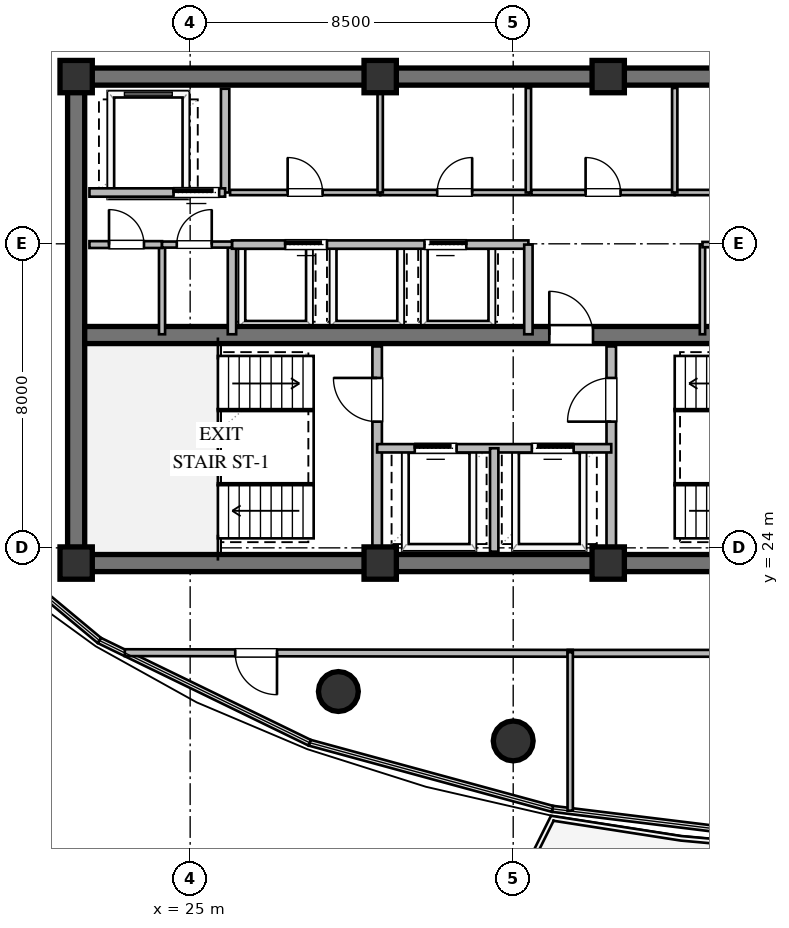
"""IFC4 building model, lengths in metres.
Left out: names, types, materials, properties, quantities, classifications, styles, units other than length and angle.
Written with IfcOpenShell. Run it as: python <this file> out.ifc"""

import sys

from ifc_helpers import new_model, si_unit, direction, frame, frame_2d, origin, origin_2d, place, context, subcontext, project, spatial, rectangle, circle, extrude, element, fill, save


model = new_model("IFC4")
c1 = context("Model", 3, precision=1e-05, world=origin(), true_north=direction((0.0, 1.0)))
c2 = subcontext(c1, "Body", "Model", "MODEL_VIEW")
j1 = project(units=[si_unit("LENGTHUNIT", "METRE"), si_unit("PLANEANGLEUNIT", "RADIAN")], contexts=[c1])
p1 = place(None, origin())
s1 = spatial("IfcSite", under=j1, at=p1, CompositionType="ELEMENT")
p2 = place(p1, origin())
s2 = spatial("IfcBuilding", under=s1, at=p2, CompositionType="ELEMENT")
p3 = place(p2, frame((0.0, 0.0, 213.6)))
s3 = spatial("IfcBuildingStorey", under=s2, at=p3, CompositionType="ELEMENT", Elevation=213.6)
for number, where, z_axis, x_axis in (
    (1, (21.775, 23.6, 0.0), (0.0, 0.0, 1.0), (1.0, 0.0, 0.0)),
    (2, (21.775, 36.4, 0.0), (0.0, 0.0, 1.0), (1.0, 0.0, 0.0)),
):
    element("IfcWall", number, at=place(p3, frame(where, z_axis=z_axis, x_axis=x_axis)), inside=s3, PredefinedType="SHEAR", context=c2, shape_type="SweptSolid", body=[
        extrude(rectangle(XDim=22.45, YDim=0.45, at=frame_2d((11.225, 0.0))), origin(), (0.0, 0.0, 1.0), 3.36),
    ])
p4 = place(p3, frame((22.0, 23.825, 0.0), z_axis=(0.0, 0.0, 1.0), x_axis=(0.0, 1.0, 0.0)))
e3 = element("IfcWall", 3, at=p4, inside=s3, PredefinedType="SHEAR", context=c2, shape_type="SweptSolid", body=[
    extrude(rectangle(XDim=12.35, YDim=0.45, at=frame_2d((6.175, 0.0))), origin(), (0.0, 0.0, 1.0), 3.36),
])
p5 = place(p3, frame((22.225, 29.6, 0.0), z_axis=(0.0, 0.0, 1.0), x_axis=(1.0, 0.0, 0.0)))
e4 = element("IfcWall", 4, at=p5, inside=s3, PredefinedType="SHEAR", context=c2, shape_type="SweptSolid", body=[
    extrude(rectangle(XDim=21.55, YDim=0.45, at=frame_2d((10.775, 0.0))), origin(), (0.0, 0.0, 1.0), 3.36),
])
p6 = place(p5, frame((12.225, 0.0, 0.0)))
e5 = element("IfcOpeningElement", 5, at=p6, cuts=e4, PredefinedType="OPENING", context=c2, shape_type="SweptSolid", body=[
    extrude(rectangle(XDim=1.15, YDim=2.1, at=frame_2d((0.575, 1.05))), frame((0.0, 0.235, 0.0), z_axis=(0.0, -1.0, 0.0), x_axis=(1.0, 0.0, 0.0)), (0.0, 0.0, 1.0), 0.47),
])
for number, where, z_axis, x_axis in (
    (6, (22.0, 23.6, 0.0), (0.0, 0.0, 1.0), (1.0, 0.0, 0.0)),
    (7, (30.0, 23.6, 0.0), (0.0, 0.0, 1.0), (1.0, 0.0, 0.0)),
    (8, (36.0, 23.6, 0.0), (0.0, 0.0, 1.0), (1.0, 0.0, 0.0)),
    (9, (36.0, 36.4, 0.0), (0.0, 0.0, 1.0), (1.0, 0.0, 0.0)),
    (10, (30.0, 36.4, 0.0), (0.0, 0.0, 1.0), (1.0, 0.0, 0.0)),
    (11, (22.0, 36.4, 0.0), (0.0, 0.0, 1.0), (1.0, 0.0, 0.0)),
):
    element("IfcColumn", number, at=place(p3, frame(where, z_axis=z_axis, x_axis=x_axis)), inside=s3, PredefinedType="COLUMN", context=c2, shape_type="SweptSolid", body=[
        extrude(rectangle(XDim=0.85, YDim=0.85, at=origin_2d()), origin(), (0.0, 0.0, 1.0), 3.6),
    ])
for number, where, z_axis, x_axis in (
    (12, (28.9, 20.22, 0.0), (0.0, 0.0, 1.0), (1.0, 0.0, 0.0)),
    (13, (33.5, 18.92, 0.0), (0.0, 0.0, 1.0), (1.0, 0.0, 0.0)),
):
    element("IfcColumn", number, at=place(p3, frame(where, z_axis=z_axis, x_axis=x_axis)), inside=s3, PredefinedType="COLUMN", context=c2, shape_type="SweptSolid", body=[
        extrude(circle(Radius=0.525, at=origin_2d()), origin(), (0.0, 0.0, 1.0), 3.6),
    ])
p7 = place(p3, frame((29.92, 23.9, 0.0), z_axis=(0.0, 0.0, 1.0), x_axis=(0.0, 1.0, 0.0)))
e14 = element("IfcWall", 14, at=p7, inside=s3, PredefinedType="SOLIDWALL", context=c2, shape_type="SweptSolid", body=[
    extrude(rectangle(XDim=5.4, YDim=0.25, at=frame_2d((2.7, 0.0))), origin(), (0.0, 0.0, 1.0), 3.36),
])
p8 = place(p7, frame((3.421, 0.0, 0.0)))
e15 = element("IfcOpeningElement", 15, at=p8, cuts=e14, PredefinedType="OPENING", context=c2, shape_type="SweptSolid", body=[
    extrude(rectangle(XDim=1.15, YDim=2.1, at=frame_2d((0.575, 1.05))), frame((0.0, 0.135, 0.0), z_axis=(0.0, -1.0, 0.0), x_axis=(1.0, 0.0, 0.0)), (0.0, 0.0, 1.0), 0.27),
])
p9 = place(p3, frame((36.08, 23.9, 0.0), z_axis=(0.0, 0.0, 1.0), x_axis=(0.0, 1.0, 0.0)))
e16 = element("IfcWall", 16, at=p9, inside=s3, PredefinedType="SOLIDWALL", context=c2, shape_type="SweptSolid", body=[
    extrude(rectangle(XDim=5.4, YDim=0.25, at=frame_2d((2.7, 0.0))), origin(), (0.0, 0.0, 1.0), 3.36),
])
p10 = place(p9, frame((3.421, 0.0, 0.0)))
e17 = element("IfcOpeningElement", 17, at=p10, cuts=e16, PredefinedType="OPENING", context=c2, shape_type="SweptSolid", body=[
    extrude(rectangle(XDim=1.15, YDim=2.1, at=frame_2d((0.575, 1.05))), frame((0.0, 0.135, 0.0), z_axis=(0.0, -1.0, 0.0), x_axis=(1.0, 0.0, 0.0)), (0.0, 0.0, 1.0), 0.27),
])
p11 = place(p3, frame((29.92, 26.62, 0.0), z_axis=(0.0, 0.0, 1.0), x_axis=(1.0, 0.0, 0.0)))
e18 = element("IfcWall", 18, at=p11, inside=s3, PredefinedType="SOLIDWALL", context=c2, shape_type="SweptSolid", body=[
    extrude(rectangle(XDim=6.16, YDim=0.22, at=frame_2d((3.08, 0.0))), origin(), (0.0, 0.0, 1.0), 3.36),
])
p12 = place(p11, frame((0.99, 0.0, 0.0)))
e19 = element("IfcOpeningElement", 19, at=p12, cuts=e18, PredefinedType="OPENING", context=c2, shape_type="SweptSolid", body=[
    extrude(rectangle(XDim=1.1, YDim=2.1, at=frame_2d((0.55, 1.05))), frame((0.0, 0.12, 0.0), z_axis=(0.0, -1.0, 0.0), x_axis=(1.0, 0.0, 0.0)), (0.0, 0.0, 1.0), 0.24),
])
p13 = place(p11, frame((4.07, 0.0, 0.0)))
e20 = element("IfcOpeningElement", 20, at=p13, cuts=e18, PredefinedType="OPENING", context=c2, shape_type="SweptSolid", body=[
    extrude(rectangle(XDim=1.1, YDim=2.1, at=frame_2d((0.55, 1.05))), frame((0.0, 0.12, 0.0), z_axis=(0.0, -1.0, 0.0), x_axis=(1.0, 0.0, 0.0)), (0.0, 0.0, 1.0), 0.24),
])
p14 = place(p3, frame((33.0, 23.9, 0.0), z_axis=(0.0, 0.0, 1.0), x_axis=(0.0, 1.0, 0.0)))
e21 = element("IfcWall", 21, at=p14, inside=s3, PredefinedType="SOLIDWALL", context=c2, shape_type="SweptSolid", body=[
    extrude(rectangle(XDim=2.72, YDim=0.22, at=frame_2d((1.36, 0.0))), origin(), (0.0, 0.0, 1.0), 3.36),
])
p15 = place(p3, frame((25.92, 33.35, 0.0), z_axis=(0.0, 0.0, 1.0), x_axis=(0.0, 1.0, 0.0)))
e22 = element("IfcWall", 22, at=p15, inside=s3, PredefinedType="SOLIDWALL", context=c2, shape_type="SweptSolid", body=[
    extrude(rectangle(XDim=2.73, YDim=0.22, at=frame_2d((1.365, 0.0))), origin(), (0.0, 0.0, 1.0), 3.36),
])
p16 = place(p3, frame((22.35, 33.35, 0.0), z_axis=(0.0, 0.0, 1.0), x_axis=(1.0, 0.0, 0.0)))
e23 = element("IfcWall", 23, at=p16, inside=s3, PredefinedType="SOLIDWALL", context=c2, shape_type="SweptSolid", body=[
    extrude(rectangle(XDim=3.57, YDim=0.22, at=frame_2d((1.785, 0.0))), origin(), (0.0, 0.0, 1.0), 3.36),
])
p17 = place(p16, frame((2.213, 0.0, 0.0)))
e24 = element("IfcOpeningElement", 24, at=p17, cuts=e23, PredefinedType="OPENING", context=c2, shape_type="SweptSolid", body=[
    extrude(rectangle(XDim=1.2, YDim=2.1, at=frame_2d((0.6, 1.05))), frame((0.0, 0.12, 0.0), z_axis=(0.0, -1.0, 0.0), x_axis=(1.0, 0.0, 0.0)), (0.0, 0.0, 1.0), 0.24),
])
p18 = place(p3, frame((26.1, 29.62, 0.0), z_axis=(0.0, 0.0, 1.0), x_axis=(0.0, 1.0, 0.0)))
e25 = element("IfcWall", 25, at=p18, inside=s3, PredefinedType="SOLIDWALL", context=c2, shape_type="SweptSolid", body=[
    extrude(rectangle(XDim=2.36, YDim=0.22, at=frame_2d((1.18, 0.0))), origin(), (0.0, 0.0, 1.0), 3.36),
])
p19 = place(p3, frame((26.1, 31.98, 0.0), z_axis=(0.0, 0.0, 1.0), x_axis=(1.0, 0.0, 0.0)))
e26 = element("IfcWall", 26, at=p19, inside=s3, PredefinedType="SOLIDWALL", context=c2, shape_type="SweptSolid", body=[
    extrude(rectangle(XDim=7.8, YDim=0.22, at=frame_2d((3.9, 0.0))), origin(), (0.0, 0.0, 1.0), 3.36),
])
p20 = place(p19, frame((1.4, 0.0, 0.0)))
e27 = element("IfcOpeningElement", 27, at=p20, cuts=e26, PredefinedType="OPENING", context=c2, shape_type="SweptSolid", body=[
    extrude(rectangle(XDim=1.1, YDim=2.1, at=frame_2d((0.55, 1.05))), frame((0.0, 0.12, 0.0), z_axis=(0.0, -1.0, 0.0), x_axis=(1.0, 0.0, 0.0)), (0.0, 0.0, 1.0), 0.24),
])
p21 = place(p19, frame((5.066, 0.0, 0.0)))
e28 = element("IfcOpeningElement", 28, at=p21, cuts=e26, PredefinedType="OPENING", context=c2, shape_type="SweptSolid", body=[
    extrude(rectangle(XDim=1.1, YDim=2.1, at=frame_2d((0.55, 1.05))), frame((0.0, 0.12, 0.0), z_axis=(0.0, -1.0, 0.0), x_axis=(1.0, 0.0, 0.0)), (0.0, 0.0, 1.0), 0.24),
])
p22 = place(p3, frame((33.9, 29.62, 0.0), z_axis=(0.0, 0.0, 1.0), x_axis=(0.0, 1.0, 0.0)))
e29 = element("IfcWall", 29, at=p22, inside=s3, PredefinedType="SOLIDWALL", context=c2, shape_type="SweptSolid", body=[
    extrude(rectangle(XDim=2.36, YDim=0.22, at=frame_2d((1.18, 0.0))), origin(), (0.0, 0.0, 1.0), 3.36),
])
p23 = place(p3, frame((26.05, 33.35, 0.0), z_axis=(0.0, 0.0, 1.0), x_axis=(1.0, 0.0, 0.0)))
e30 = element("IfcWall", 30, at=p23, inside=s3, PredefinedType="PARTITIONING", context=c2, shape_type="SweptSolid", body=[
    extrude(rectangle(XDim=3.95, YDim=0.14, at=frame_2d((1.975, 0.0))), origin(), (0.0, 0.0, 1.0), 3.36),
])
p24 = place(p23, frame((1.515, 0.0, 0.0)))
e31 = element("IfcOpeningElement", 31, at=p24, cuts=e30, PredefinedType="OPENING", context=c2, shape_type="SweptSolid", body=[
    extrude(rectangle(XDim=0.92, YDim=2.1, at=frame_2d((0.46, 1.05))), frame((0.0, 0.08, 0.0), z_axis=(0.0, -1.0, 0.0), x_axis=(1.0, 0.0, 0.0)), (0.0, 0.0, 1.0), 0.16),
])
p25 = place(p3, frame((30.0, 33.35, 0.0), z_axis=(0.0, 0.0, 1.0), x_axis=(1.0, 0.0, 0.0)))
e32 = element("IfcWall", 32, at=p25, inside=s3, PredefinedType="PARTITIONING", context=c2, shape_type="SweptSolid", body=[
    extrude(rectangle(XDim=3.92, YDim=0.14, at=frame_2d((1.96, 0.0))), origin(), (0.0, 0.0, 1.0), 3.36),
])
p26 = place(p25, frame((1.5, 0.0, 0.0)))
e33 = element("IfcOpeningElement", 33, at=p26, cuts=e32, PredefinedType="OPENING", context=c2, shape_type="SweptSolid", body=[
    extrude(rectangle(XDim=0.92, YDim=2.1, at=frame_2d((0.46, 1.05))), frame((0.0, 0.08, 0.0), z_axis=(0.0, -1.0, 0.0), x_axis=(1.0, 0.0, 0.0)), (0.0, 0.0, 1.0), 0.16),
])
for number, where, z_axis, x_axis in (
    (34, (30.0, 33.35, 0.0), (0.0, 0.0, 1.0), (0.0, 1.0, 0.0)),
    (35, (33.9, 33.35, 0.0), (0.0, 0.0, 1.0), (0.0, 1.0, 0.0)),
):
    element("IfcWall", number, at=place(p3, frame(where, z_axis=z_axis, x_axis=x_axis)), inside=s3, PredefinedType="PARTITIONING", context=c2, shape_type="SweptSolid", body=[
        extrude(rectangle(XDim=2.75, YDim=0.14, at=frame_2d((1.375, 0.0))), origin(), (0.0, 0.0, 1.0), 3.36),
    ])
p27 = place(p3, frame((33.98, 33.35, 0.0), z_axis=(0.0, 0.0, 1.0), x_axis=(1.0, 0.0, 0.0)))
e36 = element("IfcWall", 36, at=p27, inside=s3, PredefinedType="PARTITIONING", context=c2, shape_type="SweptSolid", body=[
    extrude(rectangle(XDim=3.77, YDim=0.14, at=frame_2d((1.885, 0.0))), origin(), (0.0, 0.0, 1.0), 3.36),
])
p28 = place(p27, frame((1.425, 0.0, 0.0)))
e37 = element("IfcOpeningElement", 37, at=p28, cuts=e36, PredefinedType="OPENING", context=c2, shape_type="SweptSolid", body=[
    extrude(rectangle(XDim=0.92, YDim=2.1, at=frame_2d((0.46, 1.05))), frame((0.0, 0.08, 0.0), z_axis=(0.0, -1.0, 0.0), x_axis=(1.0, 0.0, 0.0)), (0.0, 0.0, 1.0), 0.16),
])
p29 = place(p3, frame((37.75, 33.35, 0.0), z_axis=(0.0, 0.0, 1.0), x_axis=(1.0, 0.0, 0.0)))
e38 = element("IfcWall", 38, at=p29, inside=s3, PredefinedType="PARTITIONING", context=c2, shape_type="SweptSolid", body=[
    extrude(rectangle(XDim=3.77, YDim=0.14, at=frame_2d((1.885, 0.0))), origin(), (0.0, 0.0, 1.0), 3.36),
])
p30 = place(p29, frame((1.425, 0.0, 0.0)))
e39 = element("IfcOpeningElement", 39, at=p30, cuts=e38, PredefinedType="OPENING", context=c2, shape_type="SweptSolid", body=[
    extrude(rectangle(XDim=0.92, YDim=2.1, at=frame_2d((0.46, 1.05))), frame((0.0, 0.08, 0.0), z_axis=(0.0, -1.0, 0.0), x_axis=(1.0, 0.0, 0.0)), (0.0, 0.0, 1.0), 0.16),
])
p31 = place(p3, frame((37.75, 33.35, 0.0), z_axis=(0.0, 0.0, 1.0), x_axis=(0.0, 1.0, 0.0)))
e40 = element("IfcWall", 40, at=p31, inside=s3, PredefinedType="PARTITIONING", context=c2, shape_type="SweptSolid", body=[
    extrude(rectangle(XDim=2.75, YDim=0.14, at=frame_2d((1.375, 0.0))), origin(), (0.0, 0.0, 1.0), 3.36),
])
p32 = place(p3, frame((24.26, 29.62, 0.0), z_axis=(0.0, 0.0, 1.0), x_axis=(0.0, 1.0, 0.0)))
e41 = element("IfcWall", 41, at=p32, inside=s3, PredefinedType="PLUMBINGWALL", context=c2, shape_type="SweptSolid", body=[
    extrude(rectangle(XDim=2.36, YDim=0.16, at=frame_2d((1.18, 0.0))), origin(), (0.0, 0.0, 1.0), 3.36),
])
p33 = place(p3, frame((22.35, 31.98, 0.0), z_axis=(0.0, 0.0, 1.0), x_axis=(1.0, 0.0, 0.0)))
e42 = element("IfcWall", 42, at=p33, inside=s3, PredefinedType="PARTITIONING", context=c2, shape_type="SweptSolid", body=[
    extrude(rectangle(XDim=1.91, YDim=0.18, at=frame_2d((0.955, 0.0))), origin(), (0.0, 0.0, 1.0), 3.36),
])
p34 = place(p33, frame((0.515, 0.0, 0.0)))
e43 = element("IfcOpeningElement", 43, at=p34, cuts=e42, PredefinedType="OPENING", context=c2, shape_type="SweptSolid", body=[
    extrude(rectangle(XDim=0.92, YDim=2.1, at=frame_2d((0.46, 1.05))), frame((0.0, 0.1, 0.0), z_axis=(0.0, -1.0, 0.0), x_axis=(1.0, 0.0, 0.0)), (0.0, 0.0, 1.0), 0.2),
])
p35 = place(p3, frame((24.26, 31.98, 0.0), z_axis=(0.0, 0.0, 1.0), x_axis=(1.0, 0.0, 0.0)))
e44 = element("IfcWall", 44, at=p35, inside=s3, PredefinedType="PLUMBINGWALL", context=c2, shape_type="SweptSolid", body=[
    extrude(rectangle(XDim=1.84, YDim=0.16, at=frame_2d((0.92, 0.0))), origin(), (0.0, 0.0, 1.0), 3.36),
])
p36 = place(p35, frame((0.388, 0.0, 0.0)))
e45 = element("IfcOpeningElement", 45, at=p36, cuts=e44, PredefinedType="OPENING", context=c2, shape_type="SweptSolid", body=[
    extrude(rectangle(XDim=0.92, YDim=2.1, at=frame_2d((0.46, 1.05))), frame((0.0, 0.09, 0.0), z_axis=(0.0, -1.0, 0.0), x_axis=(1.0, 0.0, 0.0)), (0.0, 0.0, 1.0), 0.18),
])
p37 = place(p3, frame((38.48, 29.62, 0.0), z_axis=(0.0, 0.0, 1.0), x_axis=(0.0, 1.0, 0.0)))
e46 = element("IfcWall", 46, at=p37, inside=s3, PredefinedType="PARTITIONING", context=c2, shape_type="SweptSolid", body=[
    extrude(rectangle(XDim=2.36, YDim=0.14, at=frame_2d((1.18, 0.0))), origin(), (0.0, 0.0, 1.0), 3.36),
])
p38 = place(p3, frame((38.48, 31.98, 0.0), z_axis=(0.0, 0.0, 1.0), x_axis=(1.0, 0.0, 0.0)))
e47 = element("IfcWall", 47, at=p38, inside=s3, PredefinedType="PARTITIONING", context=c2, shape_type="SweptSolid", body=[
    extrude(rectangle(XDim=3.04, YDim=0.14, at=frame_2d((1.52, 0.0))), origin(), (0.0, 0.0, 1.0), 3.36),
])
p39 = place(p38, frame((1.045, 0.0, 0.0)))
e48 = element("IfcOpeningElement", 48, at=p39, cuts=e47, PredefinedType="OPENING", context=c2, shape_type="SweptSolid", body=[
    extrude(rectangle(XDim=0.92, YDim=2.1, at=frame_2d((0.46, 1.05))), frame((0.0, 0.08, 0.0), z_axis=(0.0, -1.0, 0.0), x_axis=(1.0, 0.0, 0.0)), (0.0, 0.0, 1.0), 0.16),
])
p40 = place(p3, frame((35.065, 21.225, 0.0), z_axis=(0.0, 0.0, 1.0), x_axis=(-0.999998948453, 0.001450204611, 0.0)))
e49 = element("IfcWall", 49, at=p40, inside=s3, PredefinedType="PARTITIONING", context=c2, shape_type="SweptSolid", body=[
    extrude(rectangle(XDim=11.784, YDim=0.18, at=frame_2d((5.892, 0.0))), origin(), (0.0, 0.0, 1.0), 2.806),
])
p41 = place(p40, frame((7.779, 0.0, 0.0)))
e50 = element("IfcOpeningElement", 50, at=p41, cuts=e49, PredefinedType="OPENING", context=c2, shape_type="SweptSolid", body=[
    extrude(rectangle(XDim=1.1, YDim=2.1, at=frame_2d((0.55, 1.05))), frame((0.0, 0.1, 0.0), z_axis=(0.0, -1.0, 0.0), x_axis=(1.0, 0.0, 0.0)), (0.0, 0.0, 1.0), 0.2),
])
p42 = place(p3, frame((46.405, 21.225, 0.0), z_axis=(0.0, 0.0, 1.0), x_axis=(-1.0, 0.0, 0.0)))
e51 = element("IfcWall", 51, at=p42, inside=s3, PredefinedType="PARTITIONING", context=c2, shape_type="SweptSolid", body=[
    extrude(rectangle(XDim=11.47, YDim=0.18, at=frame_2d((5.735, 0.0))), origin(), (0.0, 0.0, 1.0), 2.996),
])
p43 = place(p42, frame((5.135, 0.0, 0.0)))
e52 = element("IfcOpeningElement", 52, at=p43, cuts=e51, PredefinedType="OPENING", context=c2, shape_type="SweptSolid", body=[
    extrude(rectangle(XDim=1.2, YDim=2.15, at=frame_2d((0.6, 1.075))), frame((0.0, 0.1, 0.0), z_axis=(0.0, -1.0, 0.0), x_axis=(1.0, 0.0, 0.0)), (0.0, 0.0, 1.0), 0.2),
])
p44 = place(p3, frame((35.0, 21.255, 0.0), z_axis=(0.0, 0.0, 1.0), x_axis=(0.0, -1.0, 0.0)))
e53 = element("IfcWall", 53, at=p44, inside=s3, PredefinedType="PARTITIONING", context=c2, shape_type="SweptSolid", body=[
    extrude(rectangle(XDim=4.169, YDim=0.14, at=frame_2d((2.085, 0.0))), origin(), (0.0, 0.0, 1.0), 3.36),
])
p45 = place(p8, origin())
e54 = element("IfcDoor", 54, at=p45, inside=s3, OperationType="SINGLE_SWING_RIGHT", PredefinedType="DOOR", context=c2, shape_type="SweptSolid", body=[
    extrude(rectangle(XDim=1.15, YDim=2.1, at=frame_2d((0.575, 1.05))), frame((0.0, 0.025, 0.0), z_axis=(0.0, -1.0, 0.0), x_axis=(1.0, 0.0, 0.0)), (0.0, 0.0, 1.0), 0.05),
])
fill(e15, e54)
p46 = place(p10, origin())
e55 = element("IfcDoor", 55, at=p46, inside=s3, OperationType="SINGLE_SWING_LEFT", PredefinedType="DOOR", context=c2, shape_type="SweptSolid", body=[
    extrude(rectangle(XDim=1.15, YDim=2.1, at=frame_2d((0.575, 1.05))), frame((0.0, 0.025, 0.0), z_axis=(0.0, -1.0, 0.0), x_axis=(1.0, 0.0, 0.0)), (0.0, 0.0, 1.0), 0.05),
])
fill(e17, e55)
p47 = place(p12, origin())
e56 = element("IfcDoor", 56, at=p47, inside=s3, OperationType="SLIDING_TO_LEFT", PredefinedType="DOOR", context=c2, shape_type="SweptSolid", body=[
    extrude(rectangle(XDim=1.1, YDim=2.1, at=frame_2d((0.55, 1.05))), frame((0.0, 0.025, 0.0), z_axis=(0.0, -1.0, 0.0), x_axis=(1.0, 0.0, 0.0)), (0.0, 0.0, 1.0), 0.05),
])
fill(e19, e56)
p48 = place(p13, origin())
e57 = element("IfcDoor", 57, at=p48, inside=s3, OperationType="SLIDING_TO_RIGHT", PredefinedType="DOOR", context=c2, shape_type="SweptSolid", body=[
    extrude(rectangle(XDim=1.1, YDim=2.1, at=frame_2d((0.55, 1.05))), frame((0.0, 0.025, 0.0), z_axis=(0.0, -1.0, 0.0), x_axis=(1.0, 0.0, 0.0)), (0.0, 0.0, 1.0), 0.05),
])
fill(e20, e57)
p49 = place(p6, origin())
e58 = element("IfcDoor", 58, at=p49, inside=s3, OperationType="SINGLE_SWING_LEFT", PredefinedType="DOOR", context=c2, shape_type="SweptSolid", body=[
    extrude(rectangle(XDim=1.15, YDim=2.1, at=frame_2d((0.575, 1.05))), frame((0.0, 0.025, 0.0), z_axis=(0.0, -1.0, 0.0), x_axis=(1.0, 0.0, 0.0)), (0.0, 0.0, 1.0), 0.05),
])
fill(e5, e58)
p50 = place(p17, origin())
e59 = element("IfcDoor", 59, at=p50, inside=s3, OperationType="SLIDING_TO_LEFT", PredefinedType="DOOR", context=c2, shape_type="SweptSolid", body=[
    extrude(rectangle(XDim=1.2, YDim=2.1, at=frame_2d((0.6, 1.05))), frame((0.0, 0.025, 0.0), z_axis=(0.0, -1.0, 0.0), x_axis=(1.0, 0.0, 0.0)), (0.0, 0.0, 1.0), 0.05),
])
fill(e24, e59)
p51 = place(p20, origin())
e60 = element("IfcDoor", 60, at=p51, inside=s3, OperationType="SLIDING_TO_LEFT", PredefinedType="DOOR", context=c2, shape_type="SweptSolid", body=[
    extrude(rectangle(XDim=1.1, YDim=2.1, at=frame_2d((0.55, 1.05))), frame((0.0, 0.025, 0.0), z_axis=(0.0, -1.0, 0.0), x_axis=(1.0, 0.0, 0.0)), (0.0, 0.0, 1.0), 0.05),
])
fill(e27, e60)
p52 = place(p21, origin())
e61 = element("IfcDoor", 61, at=p52, inside=s3, OperationType="SLIDING_TO_RIGHT", PredefinedType="DOOR", context=c2, shape_type="SweptSolid", body=[
    extrude(rectangle(XDim=1.1, YDim=2.1, at=frame_2d((0.55, 1.05))), frame((0.0, 0.025, 0.0), z_axis=(0.0, -1.0, 0.0), x_axis=(1.0, 0.0, 0.0)), (0.0, 0.0, 1.0), 0.05),
])
fill(e28, e61)
p53 = place(p24, origin())
e62 = element("IfcDoor", 62, at=p53, inside=s3, OperationType="SINGLE_SWING_LEFT", PredefinedType="DOOR", context=c2, shape_type="SweptSolid", body=[
    extrude(rectangle(XDim=0.92, YDim=2.1, at=frame_2d((0.46, 1.05))), frame((0.0, 0.025, 0.0), z_axis=(0.0, -1.0, 0.0), x_axis=(1.0, 0.0, 0.0)), (0.0, 0.0, 1.0), 0.05),
])
fill(e31, e62)
p54 = place(p26, origin())
e63 = element("IfcDoor", 63, at=p54, inside=s3, OperationType="SINGLE_SWING_RIGHT", PredefinedType="DOOR", context=c2, shape_type="SweptSolid", body=[
    extrude(rectangle(XDim=0.92, YDim=2.1, at=frame_2d((0.46, 1.05))), frame((0.0, 0.025, 0.0), z_axis=(0.0, -1.0, 0.0), x_axis=(1.0, 0.0, 0.0)), (0.0, 0.0, 1.0), 0.05),
])
fill(e33, e63)
p55 = place(p28, origin())
e64 = element("IfcDoor", 64, at=p55, inside=s3, OperationType="SINGLE_SWING_LEFT", PredefinedType="DOOR", context=c2, shape_type="SweptSolid", body=[
    extrude(rectangle(XDim=0.92, YDim=2.1, at=frame_2d((0.46, 1.05))), frame((0.0, 0.025, 0.0), z_axis=(0.0, -1.0, 0.0), x_axis=(1.0, 0.0, 0.0)), (0.0, 0.0, 1.0), 0.05),
])
fill(e37, e64)
p56 = place(p34, origin())
e65 = element("IfcDoor", 65, at=p56, inside=s3, OperationType="SINGLE_SWING_LEFT", PredefinedType="DOOR", context=c2, shape_type="SweptSolid", body=[
    extrude(rectangle(XDim=0.92, YDim=2.1, at=frame_2d((0.46, 1.05))), frame((0.0, 0.025, 0.0), z_axis=(0.0, -1.0, 0.0), x_axis=(1.0, 0.0, 0.0)), (0.0, 0.0, 1.0), 0.05),
])
fill(e43, e65)
p57 = place(p36, origin())
e66 = element("IfcDoor", 66, at=p57, inside=s3, OperationType="SINGLE_SWING_RIGHT", PredefinedType="DOOR", context=c2, shape_type="SweptSolid", body=[
    extrude(rectangle(XDim=0.92, YDim=2.1, at=frame_2d((0.46, 1.05))), frame((0.0, 0.025, 0.0), z_axis=(0.0, -1.0, 0.0), x_axis=(1.0, 0.0, 0.0)), (0.0, 0.0, 1.0), 0.05),
])
fill(e45, e66)
p58 = place(p41, origin())
e67 = element("IfcDoor", 67, at=p58, inside=s3, OperationType="SINGLE_SWING_LEFT", PredefinedType="DOOR", context=c2, shape_type="SweptSolid", body=[
    extrude(rectangle(XDim=1.1, YDim=2.1, at=frame_2d((0.55, 1.05))), frame((0.0, 0.025, 0.0), z_axis=(0.0, -1.0, 0.0), x_axis=(1.0, 0.0, 0.0)), (0.0, 0.0, 1.0), 0.05),
])
fill(e50, e67)
save(model, sys.argv[1])
